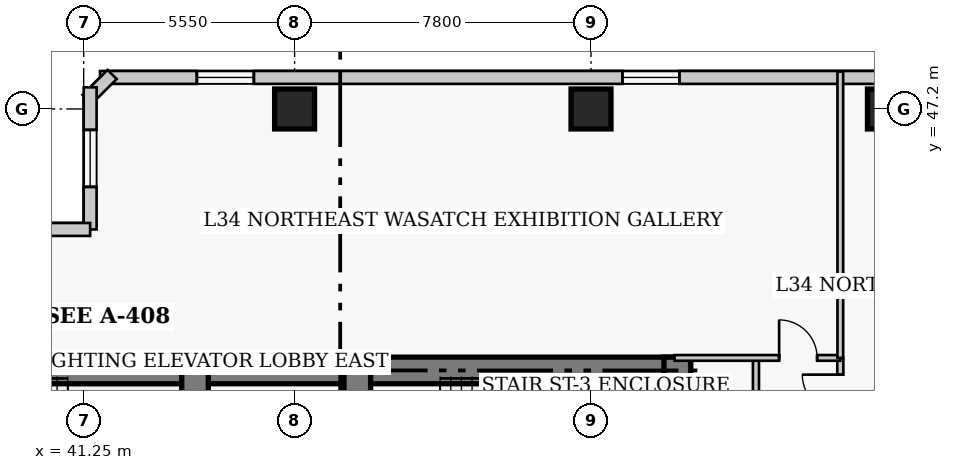
"""IFC4 building model, lengths in metres.
Left out: names, types, materials, properties, quantities, classifications, styles, units other than length and angle.
Written with IfcOpenShell. Run it as: python <this file> out.ifc"""

import sys

from ifc_helpers import new_model, si_unit, direction, frame, frame_2d, origin, origin_2d, place, context, subcontext, project, spatial, rectangle, extrude, element, fill, save


model = new_model("IFC4")
c1 = context("Model", 3, precision=1e-05, world=origin(), true_north=direction((0.0, 1.0)))
c2 = subcontext(c1, "Body", "Model", "MODEL_VIEW")
j1 = project(units=[si_unit("LENGTHUNIT", "METRE"), si_unit("PLANEANGLEUNIT", "RADIAN")], contexts=[c1])
p1 = place(None, origin())
s1 = spatial("IfcSite", under=j1, at=p1, CompositionType="ELEMENT")
p2 = place(p1, origin())
s2 = spatial("IfcBuilding", under=s1, at=p2, CompositionType="ELEMENT")
p3 = place(p2, frame((0.0, 0.0, 138.4)))
s3 = spatial("IfcBuildingStorey", under=s2, at=p3, CompositionType="ELEMENT", Elevation=138.4)
p4 = place(p3, frame((35.85, 40.32, 0.0), z_axis=(0.0, 0.0, 1.0), x_axis=(1.0, 0.0, 0.0)))
e1 = element("IfcWall", 1, at=p4, inside=s3, PredefinedType="SHEAR", context=c2, shape_type="SweptSolid", body=[
    extrude(rectangle(XDim=12.6, YDim=0.7, at=frame_2d((6.3, 0.0))), origin(), (0.0, 0.0, 1.0), 3.8),
])
p5 = place(p3, frame((48.45, 40.32, 0.0), z_axis=(0.0, 0.0, 1.0), x_axis=(1.0, 0.0, 0.0)))
e2 = element("IfcWall", 2, at=p5, inside=s3, PredefinedType="SHEAR", context=c2, shape_type="SweptSolid", body=[
    extrude(rectangle(XDim=8.77, YDim=0.7, at=frame_2d((4.385, 0.0))), origin(), (0.0, 0.0, 1.0), 3.8),
])
p6 = place(p3, frame((56.87, 27.05, 0.0), z_axis=(0.0, 0.0, 1.0), x_axis=(0.0, 1.0, 0.0)))
e3 = element("IfcWall", 3, at=p6, inside=s3, PredefinedType="SHEAR", context=c2, shape_type="SweptSolid", body=[
    extrude(rectangle(XDim=13.62, YDim=0.7, at=frame_2d((6.81, 0.0))), origin(), (0.0, 0.0, 1.0), 3.8),
])
p7 = place(p3, frame((44.18, 36.37, 0.0), z_axis=(0.0, 0.0, 1.0), x_axis=(0.0, 1.0, 0.0)))
e4 = element("IfcWall", 4, at=p7, inside=s3, PredefinedType="SHEAR", context=c2, shape_type="SweptSolid", body=[
    extrude(rectangle(XDim=3.95, YDim=0.7, at=frame_2d((1.975, 0.0))), origin(), (0.0, 0.0, 1.0), 3.8),
])
p8 = place(p3, frame((48.45, 32.4, 0.0), z_axis=(0.0, 0.0, 1.0), x_axis=(0.0, 1.0, 0.0)))
e5 = element("IfcWall", 5, at=p8, inside=s3, PredefinedType="SHEAR", context=c2, shape_type="SweptSolid", body=[
    extrude(rectangle(XDim=7.92, YDim=0.7, at=frame_2d((3.96, 0.0))), origin(), (0.0, 0.0, 1.0), 3.8),
])
p9 = place(p8, frame((5.8, 0.0, 0.0)))
e6 = element("IfcOpeningElement", 6, at=p9, cuts=e5, PredefinedType="OPENING", context=c2, shape_type="SweptSolid", body=[
    extrude(rectangle(XDim=1.1, YDim=2.15, at=frame_2d((0.55, 1.075))), frame((0.0, 0.36, 0.0), z_axis=(0.0, -1.0, 0.0), x_axis=(1.0, 0.0, 0.0)), (0.0, 0.0, 1.0), 0.72),
])
for number, where, z_axis, x_axis in (
    (7, (46.8, 47.2, 0.0), (0.0, 0.0, 1.0), (1.0, 0.0, 0.0)),
    (8, (54.6, 47.2, 0.0), (0.0, 0.0, 1.0), (1.0, 0.0, 0.0)),
    (9, (62.4, 47.2, 0.0), (0.0, 0.0, 1.0), (1.0, 0.0, 0.0)),
):
    element("IfcColumn", number, at=place(p3, frame(where, z_axis=z_axis, x_axis=x_axis)), inside=s3, PredefinedType="COLUMN", context=c2, shape_type="SweptSolid", body=[
        extrude(rectangle(XDim=1.05, YDim=1.05, at=origin_2d()), origin(), (0.0, 0.0, 1.0), 3.8),
    ])
p10 = place(p3, frame((68.37, 48.03, 0.0), z_axis=(0.0, 0.0, 1.0), x_axis=(-1.0, 0.0, 0.0)))
e10 = element("IfcWall", 10, at=p10, inside=s3, PredefinedType="SOLIDWALL", context=c2, shape_type="SweptSolid", body=[
    extrude(rectangle(XDim=26.69, YDim=0.34, at=frame_2d((13.345, 0.0))), origin(), (0.0, 0.0, 1.0), 3.55),
])
p11 = place(p10, frame((3.048, 0.0, 0.85)))
e11 = element("IfcOpeningElement", 11, at=p11, cuts=e10, PredefinedType="OPENING", context=c2, shape_type="SweptSolid", body=[
    extrude(rectangle(XDim=1.5, YDim=1.75, at=frame_2d((0.75, 0.875))), frame((0.0, 0.18, 0.0), z_axis=(0.0, -1.0, 0.0), x_axis=(1.0, 0.0, 0.0)), (0.0, 0.0, 1.0), 0.36),
])
p12 = place(p10, frame((11.445, 0.0, 0.85)))
e12 = element("IfcOpeningElement", 12, at=p12, cuts=e10, PredefinedType="OPENING", context=c2, shape_type="SweptSolid", body=[
    extrude(rectangle(XDim=1.5, YDim=1.75, at=frame_2d((0.75, 0.875))), frame((0.0, 0.18, 0.0), z_axis=(0.0, -1.0, 0.0), x_axis=(1.0, 0.0, 0.0)), (0.0, 0.0, 1.0), 0.36),
])
p13 = place(p10, frame((22.642, 0.0, 0.85)))
e13 = element("IfcOpeningElement", 13, at=p13, cuts=e10, PredefinedType="OPENING", context=c2, shape_type="SweptSolid", body=[
    extrude(rectangle(XDim=1.5, YDim=1.75, at=frame_2d((0.75, 0.875))), frame((0.0, 0.18, 0.0), z_axis=(0.0, -1.0, 0.0), x_axis=(1.0, 0.0, 0.0)), (0.0, 0.0, 1.0), 0.36),
])
p14 = place(p3, frame((41.999, 48.108, 0.0), z_axis=(0.0, 0.0, 1.0), x_axis=(-0.707106781187, -0.707106781187, 0.0)))
e14 = element("IfcWall", 14, at=p14, inside=s3, PredefinedType="SOLIDWALL", context=c2, shape_type="SweptSolid", body=[
    extrude(rectangle(XDim=0.929, YDim=0.34, at=frame_2d((0.464, 0.0))), origin(), (0.0, 0.0, 1.0), 3.55),
])
p15 = place(p3, frame((41.42, 47.77, 0.0), z_axis=(0.0, 0.0, 1.0), x_axis=(0.0, -1.0, 0.0)))
e15 = element("IfcWall", 15, at=p15, inside=s3, PredefinedType="SOLIDWALL", context=c2, shape_type="SweptSolid", body=[
    extrude(rectangle(XDim=3.74, YDim=0.34, at=frame_2d((1.87, 0.0))), origin(), (0.0, 0.0, 1.0), 3.55),
])
p16 = place(p15, frame((1.12, 0.0, 0.85)))
e16 = element("IfcOpeningElement", 16, at=p16, cuts=e15, PredefinedType="OPENING", context=c2, shape_type="SweptSolid", body=[
    extrude(rectangle(XDim=1.5, YDim=1.75, at=frame_2d((0.75, 0.875))), frame((0.0, 0.18, 0.0), z_axis=(0.0, -1.0, 0.0), x_axis=(1.0, 0.0, 0.0)), (0.0, 0.0, 1.0), 0.36),
])
p17 = place(p3, frame((41.42, 44.03, 0.0), z_axis=(0.0, 0.0, 1.0), x_axis=(-1.0, 0.0, 0.0)))
e17 = element("IfcWall", 17, at=p17, inside=s3, PredefinedType="SOLIDWALL", context=c2, shape_type="SweptSolid", body=[
    extrude(rectangle(XDim=4.84, YDim=0.34, at=frame_2d((2.42, 0.0))), origin(), (0.0, 0.0, 1.0), 3.55),
])
p18 = place(p17, frame((1.67, 0.0, 0.85)))
e18 = element("IfcOpeningElement", 18, at=p18, cuts=e17, PredefinedType="OPENING", context=c2, shape_type="SweptSolid", body=[
    extrude(rectangle(XDim=1.5, YDim=1.75, at=frame_2d((0.75, 0.875))), frame((0.0, 0.18, 0.0), z_axis=(0.0, -1.0, 0.0), x_axis=(1.0, 0.0, 0.0)), (0.0, 0.0, 1.0), 0.36),
])
p19 = place(p3, frame((61.16, 12.05, 0.0), z_axis=(0.0, 0.0, 1.0), x_axis=(0.0, 1.0, 0.0)))
e19 = element("IfcWall", 19, at=p19, inside=s3, PredefinedType="PARTITIONING", context=c2, shape_type="SweptSolid", body=[
    extrude(rectangle(XDim=28.6, YDim=0.16, at=frame_2d((14.3, 0.0))), origin(), (0.0, 0.0, 1.0), 3.55),
])
p20 = place(p19, frame((3.5, 0.0, 0.0)))
e20 = element("IfcOpeningElement", 20, at=p20, cuts=e19, PredefinedType="OPENING", context=c2, shape_type="SweptSolid", body=[
    extrude(rectangle(XDim=0.95, YDim=2.1, at=frame_2d((0.475, 1.05))), frame((0.0, 0.09, 0.0), z_axis=(0.0, -1.0, 0.0), x_axis=(1.0, 0.0, 0.0)), (0.0, 0.0, 1.0), 0.18),
])
p21 = place(p19, frame((9.758, 0.0, 0.0)))
e21 = element("IfcOpeningElement", 21, at=p21, cuts=e19, PredefinedType="OPENING", context=c2, shape_type="SweptSolid", body=[
    extrude(rectangle(XDim=0.95, YDim=2.1, at=frame_2d((0.475, 1.05))), frame((0.0, 0.09, 0.0), z_axis=(0.0, -1.0, 0.0), x_axis=(1.0, 0.0, 0.0)), (0.0, 0.0, 1.0), 0.18),
])
p22 = place(p19, frame((27.16, 0.0, 0.0)))
e22 = element("IfcOpeningElement", 22, at=p22, cuts=e19, PredefinedType="OPENING", context=c2, shape_type="SweptSolid", body=[
    extrude(rectangle(XDim=1.0, YDim=2.15, at=frame_2d((0.5, 1.075))), frame((0.0, 0.09, 0.0), z_axis=(0.0, -1.0, 0.0), x_axis=(1.0, 0.0, 0.0)), (0.0, 0.0, 1.0), 0.18),
])
p23 = place(p3, frame((58.94, 19.01, 0.0), z_axis=(0.0, 0.0, 1.0), x_axis=(0.0, 1.0, 0.0)))
e23 = element("IfcWall", 23, at=p23, inside=s3, PredefinedType="PARTITIONING", context=c2, shape_type="SweptSolid", body=[
    extrude(rectangle(XDim=21.64, YDim=0.16, at=frame_2d((10.82, 0.0))), origin(), (0.0, 0.0, 1.0), 3.55),
])
p24 = place(p3, frame((56.8, 40.65, 0.0), z_axis=(0.0, 0.0, 1.0), x_axis=(1.0, 0.0, 0.0)))
e24 = element("IfcWall", 24, at=p24, inside=s3, PredefinedType="PARTITIONING", context=c2, shape_type="SweptSolid", body=[
    extrude(rectangle(XDim=4.36, YDim=0.15, at=frame_2d((2.18, 0.0))), origin(), (0.0, 0.0, 1.0), 3.55),
])
p25 = place(p24, frame((2.75, 0.0, 0.0)))
e25 = element("IfcOpeningElement", 25, at=p25, cuts=e24, PredefinedType="OPENING", context=c2, shape_type="SweptSolid", body=[
    extrude(rectangle(XDim=1.0, YDim=2.15, at=frame_2d((0.5, 1.075))), frame((0.0, 0.085, 0.0), z_axis=(0.0, -1.0, 0.0), x_axis=(1.0, 0.0, 0.0)), (0.0, 0.0, 1.0), 0.17),
])
p26 = place(p3, frame((61.16, 40.65, 0.0), z_axis=(0.0, 0.0, 1.0), x_axis=(0.0, 1.0, 0.0)))
e26 = element("IfcWall", 26, at=p26, inside=s3, PredefinedType="PARTITIONING", context=c2, shape_type="SweptSolid", body=[
    extrude(rectangle(XDim=7.53, YDim=0.15, at=frame_2d((3.765, 0.0))), origin(), (0.0, 0.0, 1.0), 3.55),
])
p27 = place(p12, origin())
e27 = element("IfcWindow", 27, at=p27, inside=s3, PartitioningType="SINGLE_PANEL", PredefinedType="WINDOW", context=c2, shape_type="SweptSolid", body=[
    extrude(rectangle(XDim=1.5, YDim=1.75, at=frame_2d((0.75, 0.875))), frame((0.0, 0.03, 0.0), z_axis=(0.0, -1.0, 0.0), x_axis=(1.0, 0.0, 0.0)), (0.0, 0.0, 1.0), 0.06),
])
fill(e12, e27)
p28 = place(p13, origin())
e28 = element("IfcWindow", 28, at=p28, inside=s3, PartitioningType="SINGLE_PANEL", PredefinedType="WINDOW", context=c2, shape_type="SweptSolid", body=[
    extrude(rectangle(XDim=1.5, YDim=1.75, at=frame_2d((0.75, 0.875))), frame((0.0, 0.03, 0.0), z_axis=(0.0, -1.0, 0.0), x_axis=(1.0, 0.0, 0.0)), (0.0, 0.0, 1.0), 0.06),
])
fill(e13, e28)
p29 = place(p16, origin())
e29 = element("IfcWindow", 29, at=p29, inside=s3, PartitioningType="SINGLE_PANEL", PredefinedType="WINDOW", context=c2, shape_type="SweptSolid", body=[
    extrude(rectangle(XDim=1.5, YDim=1.75, at=frame_2d((0.75, 0.875))), frame((0.0, 0.03, 0.0), z_axis=(0.0, -1.0, 0.0), x_axis=(1.0, 0.0, 0.0)), (0.0, 0.0, 1.0), 0.06),
])
fill(e16, e29)
p30 = place(p25, origin())
e30 = element("IfcDoor", 30, at=p30, inside=s3, OperationType="SINGLE_SWING_LEFT", PredefinedType="DOOR", context=c2, shape_type="SweptSolid", body=[
    extrude(rectangle(XDim=1.0, YDim=2.15, at=frame_2d((0.5, 1.075))), frame((0.0, 0.025, 0.0), z_axis=(0.0, -1.0, 0.0), x_axis=(1.0, 0.0, 0.0)), (0.0, 0.0, 1.0), 0.05),
])
fill(e25, e30)
p31 = place(p22, origin())
e31 = element("IfcDoor", 31, at=p31, inside=s3, OperationType="SINGLE_SWING_RIGHT", PredefinedType="DOOR", context=c2, shape_type="SweptSolid", body=[
    extrude(rectangle(XDim=1.0, YDim=2.15, at=frame_2d((0.5, 1.075))), frame((0.0, 0.025, 0.0), z_axis=(0.0, -1.0, 0.0), x_axis=(1.0, 0.0, 0.0)), (0.0, 0.0, 1.0), 0.05),
])
fill(e22, e31)
save(model, sys.argv[1])
